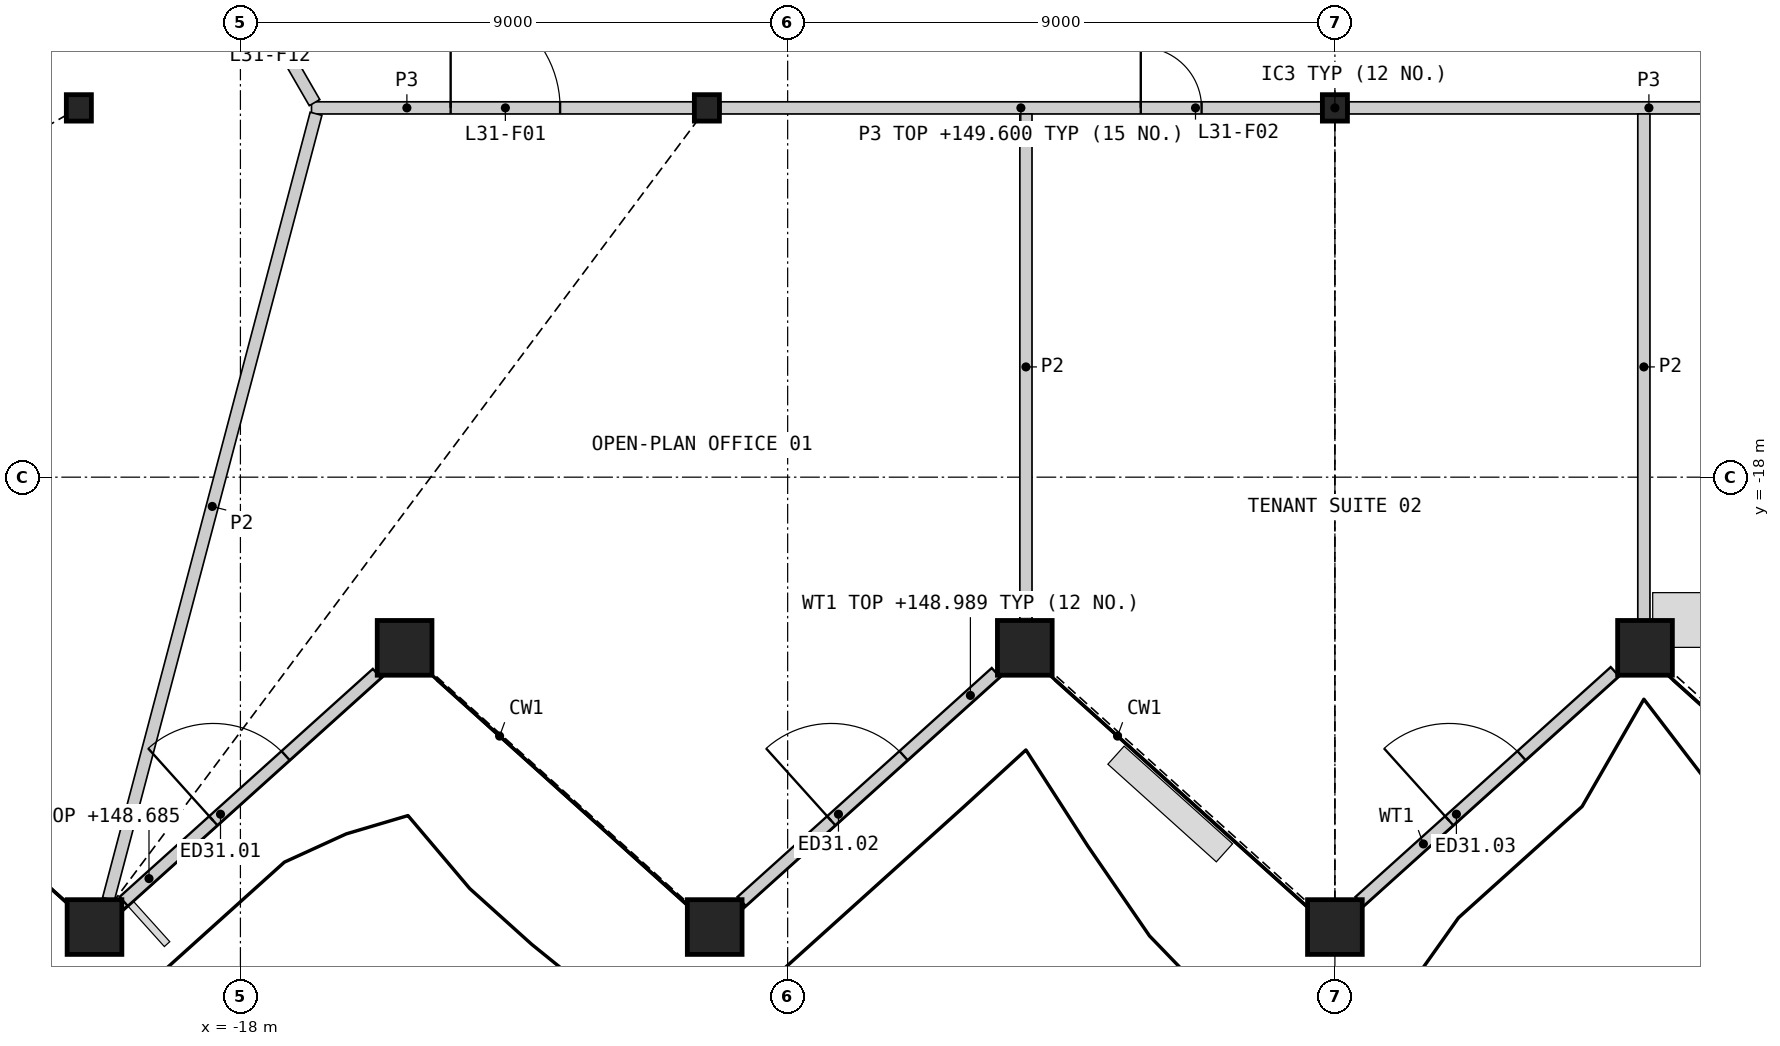
"""IFC4 building model, lengths in metres.
Left out: names, types, materials, properties, quantities, classifications, styles, units other than length and angle.
Written with IfcOpenShell. Run it as: python <this file> out.ifc"""

import sys

from ifc_helpers import new_model, si_unit, direction, frame, frame_2d, origin, origin_2d, place, context, subcontext, project, spatial, rectangle, hollow_rectangle, i_section, extrude, element, fill, save


model = new_model("IFC4")
c1 = context("Model", 3, precision=1e-05, world=origin(), true_north=direction((0.0, 1.0)))
c2 = subcontext(c1, "Body", "Model", "MODEL_VIEW")
j1 = project(units=[si_unit("LENGTHUNIT", "METRE"), si_unit("PLANEANGLEUNIT", "RADIAN")], contexts=[c1])
p1 = place(None, origin())
s1 = spatial("IfcSite", under=j1, at=p1, CompositionType="ELEMENT")
p2 = place(p1, origin())
s2 = spatial("IfcBuilding", under=s1, at=p2, CompositionType="ELEMENT")
p3 = place(p2, frame((0.0, 0.0, 145.8)))
s3 = spatial("IfcBuildingStorey", under=s2, at=p3, CompositionType="ELEMENT", Elevation=145.8)
for number, where, z_axis, x_axis in (
    (1, (-20.4, -25.399, 0.0), (0.0, 0.0, 1.0), (1.0, 0.0, 0.0)),
    (2, (-15.3, -20.807, 0.0), (0.0, 0.0, 1.0), (1.0, 0.0, 0.0)),
    (3, (-10.2, -25.399, 0.0), (0.0, 0.0, 1.0), (1.0, 0.0, 0.0)),
    (4, (-5.1, -20.807, 0.0), (0.0, 0.0, 1.0), (1.0, 0.0, 0.0)),
    (5, (0.0, -25.399, 0.0), (0.0, 0.0, 1.0), (1.0, 0.0, 0.0)),
    (6, (5.1, -20.807, 0.0), (0.0, 0.0, 1.0), (1.0, 0.0, 0.0)),
):
    element("IfcColumn", number, at=place(p3, frame(where, z_axis=z_axis, x_axis=x_axis)), inside=s3, PredefinedType="COLUMN", context=c2, shape_type="SweptSolid", body=[
        extrude(hollow_rectangle(XDim=0.9, YDim=0.9, WallThickness=0.06, at=origin_2d()), origin(), (0.0, 0.0, 1.0), 4.2),
    ])
for number, where, z_axis, x_axis in (
    (7, (-20.657, -11.926, 0.0), (0.0, 0.0, 1.0), (1.0, 0.0, 0.0)),
    (8, (-10.328, -11.926, 0.0), (0.0, 0.0, 1.0), (1.0, 0.0, 0.0)),
    (9, (0.0, -11.926, 0.0), (0.0, 0.0, 1.0), (1.0, 0.0, 0.0)),
):
    element("IfcColumn", number, at=place(p3, frame(where, z_axis=z_axis, x_axis=x_axis)), inside=s3, PredefinedType="COLUMN", context=c2, shape_type="SweptSolid", body=[
        extrude(i_section(OverallWidth=0.412, OverallDepth=0.435, WebThickness=0.036, FlangeThickness=0.057, at=origin_2d()), origin(), (0.0, 0.0, 1.0), 4.2),
    ])
p4 = place(p3, frame((-19.92, -24.977, 0.0), z_axis=(0.0, 0.0, 1.0), x_axis=(0.743146822591, 0.669128388333, 0.0)))
e10 = element("IfcWall", 10, at=p4, inside=s3, PredefinedType="SOLIDWALL", context=c2, shape_type="SweptSolid", body=[
    extrude(rectangle(XDim=5.604, YDim=0.2, at=frame_2d((2.802, 0.0))), origin(), (0.0, 0.0, 1.0), 2.885),
])
p5 = place(p4, frame((1.983, 0.0, 0.0)))
e11 = element("IfcOpeningElement", 11, at=p5, cuts=e10, PredefinedType="OPENING", context=c2, shape_type="SweptSolid", body=[
    extrude(rectangle(XDim=1.6, YDim=2.4, at=frame_2d((0.8, 1.2))), frame((0.0, 0.11, 0.0), z_axis=(0.0, -1.0, 0.0), x_axis=(1.0, 0.0, 0.0)), (0.0, 0.0, 1.0), 0.22),
])
p6 = place(p3, frame((-9.757, -24.977, 0.0), z_axis=(0.0, 0.0, 1.0), x_axis=(0.743158172546, 0.66911578264, 0.0)))
e12 = element("IfcWall", 12, at=p6, inside=s3, PredefinedType="SOLIDWALL", context=c2, shape_type="SweptSolid", body=[
    extrude(rectangle(XDim=5.625, YDim=0.2, at=frame_2d((2.812, 0.0))), origin(), (0.0, 0.0, 1.0), 3.189),
])
p7 = place(p6, frame((1.983, 0.0, 0.0)))
e13 = element("IfcOpeningElement", 13, at=p7, cuts=e12, PredefinedType="OPENING", context=c2, shape_type="SweptSolid", body=[
    extrude(rectangle(XDim=1.6, YDim=2.4, at=frame_2d((0.8, 1.2))), frame((0.0, 0.11, 0.0), z_axis=(0.0, -1.0, 0.0), x_axis=(1.0, 0.0, 0.0)), (0.0, 0.0, 1.0), 0.22),
])
p8 = place(p3, frame((0.406, -24.977, 0.0), z_axis=(0.0, 0.0, 1.0), x_axis=(0.743158726114, 0.669115167815, 0.0)))
e14 = element("IfcWall", 14, at=p8, inside=s3, PredefinedType="SOLIDWALL", context=c2, shape_type="SweptSolid", body=[
    extrude(rectangle(XDim=5.648, YDim=0.2, at=frame_2d((2.824, 0.0))), origin(), (0.0, 0.0, 1.0), 3.189),
])
p9 = place(p8, frame((1.983, 0.0, 0.0)))
e15 = element("IfcOpeningElement", 15, at=p9, cuts=e14, PredefinedType="OPENING", context=c2, shape_type="SweptSolid", body=[
    extrude(rectangle(XDim=1.6, YDim=2.4, at=frame_2d((0.8, 1.2))), frame((0.0, 0.11, 0.0), z_axis=(0.0, -1.0, 0.0), x_axis=(1.0, 0.0, 0.0)), (0.0, 0.0, 1.0), 0.22),
])
p10 = place(p3, frame((-10.101, -11.926, 0.0), z_axis=(0.0, 0.0, 1.0), x_axis=(1.0, 0.0, 0.0)))
e16 = element("IfcWall", 16, at=p10, inside=s3, PredefinedType="PARTITIONING", context=c2, shape_type="SweptSolid", body=[
    extrude(rectangle(XDim=9.874, YDim=0.2, at=frame_2d((4.937, 0.0))), origin(), (0.0, 0.0, 1.0), 3.8),
])
p11 = place(p10, frame((6.909, 0.0, 0.0)))
e17 = element("IfcOpeningElement", 17, at=p11, cuts=e16, PredefinedType="OPENING", context=c2, shape_type="SweptSolid", body=[
    extrude(rectangle(XDim=1.0, YDim=2.1, at=frame_2d((0.5, 1.05))), frame((0.0, 0.11, 0.0), z_axis=(0.0, -1.0, 0.0), x_axis=(1.0, 0.0, 0.0)), (0.0, 0.0, 1.0), 0.22),
])
p12 = place(p3, frame((0.227, -11.926, 0.0), z_axis=(0.0, 0.0, 1.0), x_axis=(1.0, 0.0, 0.0)))
e18 = element("IfcWall", 18, at=p12, inside=s3, PredefinedType="PARTITIONING", context=c2, shape_type="SweptSolid", body=[
    extrude(rectangle(XDim=9.874, YDim=0.2, at=frame_2d((4.937, 0.0))), origin(), (0.0, 0.0, 1.0), 3.8),
])
p13 = place(p3, frame((-16.831, -11.926, 0.0), z_axis=(0.0, 0.0, 1.0), x_axis=(1.0, 0.0, 0.0)))
e19 = element("IfcWall", 19, at=p13, inside=s3, PredefinedType="PARTITIONING", context=c2, shape_type="SweptSolid", body=[
    extrude(rectangle(XDim=6.275, YDim=0.2, at=frame_2d((3.137, 0.0))), origin(), (0.0, 0.0, 1.0), 3.8),
])
p14 = place(p13, frame((2.289, 0.0, 0.0)))
e20 = element("IfcOpeningElement", 20, at=p14, cuts=e19, PredefinedType="OPENING", context=c2, shape_type="SweptSolid", body=[
    extrude(rectangle(XDim=1.8, YDim=2.1, at=frame_2d((0.9, 1.05))), frame((0.0, 0.11, 0.0), z_axis=(0.0, -1.0, 0.0), x_axis=(1.0, 0.0, 0.0)), (0.0, 0.0, 1.0), 0.22),
])
p15 = place(p3, frame((-18.644, -8.613, 0.0), z_axis=(0.0, 0.0, 1.0), x_axis=(0.499958791762, -0.866049194065, 0.0)))
e21 = element("IfcWall", 21, at=p15, inside=s3, PredefinedType="PARTITIONING", context=c2, shape_type="SweptSolid", body=[
    extrude(rectangle(XDim=3.726, YDim=0.2, at=frame_2d((1.863, 0.0))), origin(), (0.0, 0.0, 1.0), 3.8),
])
p16 = place(p15, frame((1.363, 0.0, 0.0)))
e22 = element("IfcOpeningElement", 22, at=p16, cuts=e21, PredefinedType="OPENING", context=c2, shape_type="SweptSolid", body=[
    extrude(rectangle(XDim=1.0, YDim=2.1, at=frame_2d((0.5, 1.05))), frame((0.0, 0.11, 0.0), z_axis=(0.0, -1.0, 0.0), x_axis=(1.0, 0.0, 0.0)), (0.0, 0.0, 1.0), 0.22),
])
p17 = place(p3, frame((-20.17, -24.939, 0.0), z_axis=(0.0, 0.0, 1.0), x_axis=(0.25554647156, 0.966796773305, 0.0)))
e23 = element("IfcWall", 23, at=p17, inside=s3, PredefinedType="PARTITIONING", context=c2, shape_type="SweptSolid", body=[
    extrude(rectangle(XDim=13.36, YDim=0.2, at=frame_2d((6.68, 0.0))), origin(), (0.0, 0.0, 1.0), 2.885),
])
for number, where, z_axis, x_axis in (
    (24, (-5.081, -20.347, 0.0), (0.0, 0.0, 1.0), (0.0, 1.0, 0.0)),
    (25, (5.081, -20.347, 0.0), (0.0, 0.0, 1.0), (0.0, 1.0, 0.0)),
):
    element("IfcWall", number, at=place(p3, frame(where, z_axis=z_axis, x_axis=x_axis)), inside=s3, PredefinedType="PARTITIONING", context=c2, shape_type="SweptSolid", body=[
        extrude(rectangle(XDim=8.321, YDim=0.2, at=frame_2d((4.16, 0.0))), origin(), (0.0, 0.0, 1.0), 2.885),
    ])
p18 = place(p5, origin())
e26 = element("IfcDoor", 26, at=p18, inside=s3, OperationType="DOUBLE_DOOR_SINGLE_SWING", PredefinedType="DOOR", context=c2, shape_type="SweptSolid", body=[
    extrude(rectangle(XDim=1.6, YDim=2.4, at=frame_2d((0.8, 1.2))), frame((0.0, 0.025, 0.0), z_axis=(0.0, -1.0, 0.0), x_axis=(1.0, 0.0, 0.0)), (0.0, 0.0, 1.0), 0.05),
])
fill(e11, e26)
p19 = place(p7, origin())
e27 = element("IfcDoor", 27, at=p19, inside=s3, OperationType="DOUBLE_DOOR_SINGLE_SWING", PredefinedType="DOOR", context=c2, shape_type="SweptSolid", body=[
    extrude(rectangle(XDim=1.6, YDim=2.4, at=frame_2d((0.8, 1.2))), frame((0.0, 0.025, 0.0), z_axis=(0.0, -1.0, 0.0), x_axis=(1.0, 0.0, 0.0)), (0.0, 0.0, 1.0), 0.05),
])
fill(e13, e27)
p20 = place(p9, origin())
e28 = element("IfcDoor", 28, at=p20, inside=s3, OperationType="DOUBLE_DOOR_SINGLE_SWING", PredefinedType="DOOR", context=c2, shape_type="SweptSolid", body=[
    extrude(rectangle(XDim=1.6, YDim=2.4, at=frame_2d((0.8, 1.2))), frame((0.0, 0.025, 0.0), z_axis=(0.0, -1.0, 0.0), x_axis=(1.0, 0.0, 0.0)), (0.0, 0.0, 1.0), 0.05),
])
fill(e15, e28)
p21 = place(p14, origin())
e29 = element("IfcDoor", 29, at=p21, inside=s3, OperationType="DOUBLE_DOOR_SINGLE_SWING", PredefinedType="DOOR", context=c2, shape_type="SweptSolid", body=[
    extrude(rectangle(XDim=1.8, YDim=2.1, at=frame_2d((0.9, 1.05))), frame((0.0, 0.025, 0.0), z_axis=(0.0, -1.0, 0.0), x_axis=(1.0, 0.0, 0.0)), (0.0, 0.0, 1.0), 0.05),
])
fill(e20, e29)
p22 = place(p11, origin())
e30 = element("IfcDoor", 30, at=p22, inside=s3, OperationType="SINGLE_SWING_LEFT", PredefinedType="DOOR", context=c2, shape_type="SweptSolid", body=[
    extrude(rectangle(XDim=1.0, YDim=2.1, at=frame_2d((0.5, 1.05))), frame((0.0, 0.025, 0.0), z_axis=(0.0, -1.0, 0.0), x_axis=(1.0, 0.0, 0.0)), (0.0, 0.0, 1.0), 0.05),
])
fill(e17, e30)
save(model, sys.argv[1])
